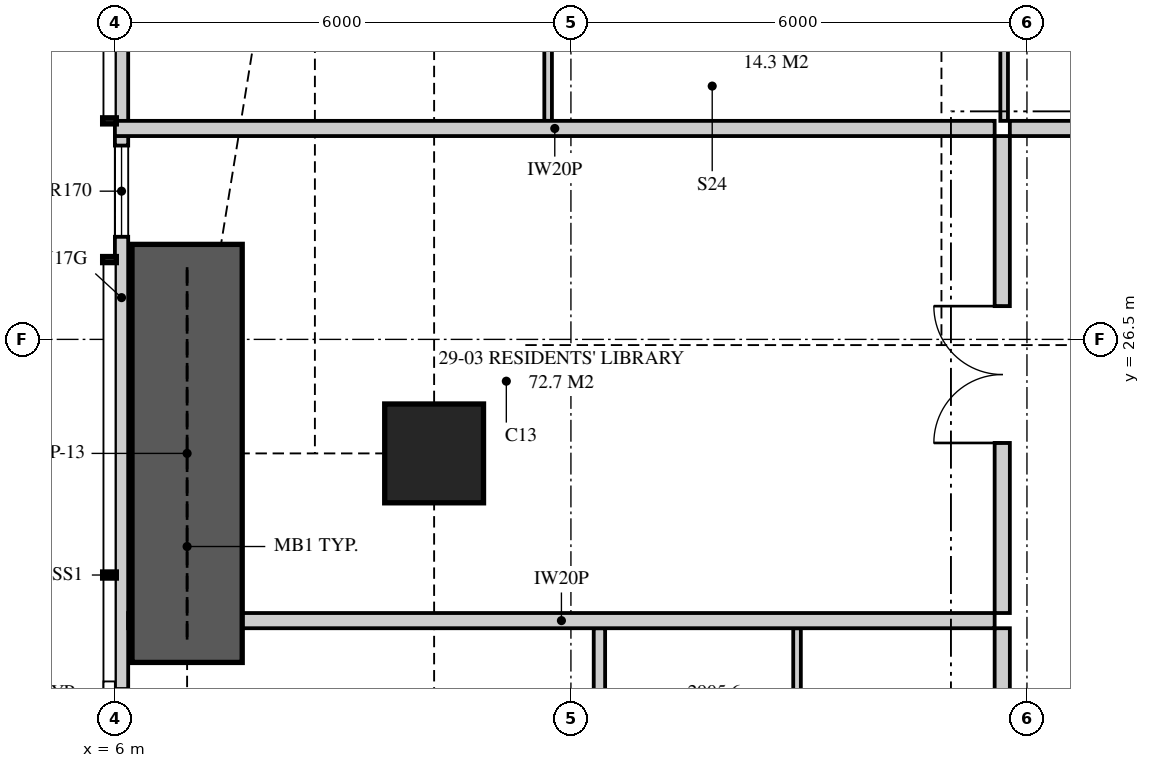
"""IFC4 building model, lengths in metres.
Left out: names, types, materials, properties, quantities, classifications, styles, units other than length and angle.
Written with IfcOpenShell. Run it as: python <this file> out.ifc"""

import sys

from ifc_helpers import new_model, si_unit, direction, frame, frame_2d, origin, origin_2d, place, context, subcontext, project, spatial, polyline, rectangle, outline, extrude, element, fill, save


model = new_model("IFC4")
c1 = context("Model", 3, precision=1e-05, world=origin(), true_north=direction((0.0, 1.0)))
c2 = subcontext(c1, "Body", "Model", "MODEL_VIEW")
j1 = project(units=[si_unit("LENGTHUNIT", "METRE"), si_unit("PLANEANGLEUNIT", "RADIAN")], contexts=[c1])
p1 = place(None, origin())
s1 = spatial("IfcSite", under=j1, at=p1, CompositionType="ELEMENT")
p2 = place(p1, origin())
s2 = spatial("IfcBuilding", under=s1, at=p2, CompositionType="ELEMENT")
p3 = place(p2, frame((0.0, 0.0, 108.2)))
s3 = spatial("IfcBuildingStorey", under=s2, at=p3, CompositionType="ELEMENT", Elevation=108.2)
p4 = place(p3, frame((10.2, 25.0, 0.0), z_axis=(0.0, 0.0, 1.0), x_axis=(1.0, 0.0, 0.0)))
e1 = element("IfcColumn", 1, at=p4, inside=s3, PredefinedType="COLUMN", context=c2, shape_type="SweptSolid", body=[
    extrude(rectangle(XDim=1.3, YDim=1.3, at=origin_2d()), origin(), (0.0, 0.0, 1.0), 3.35),
])
p5 = place(p3, frame((6.087, 34.949, 0.0), z_axis=(0.0, 0.0, 1.0), x_axis=(0.0, -1.0, 0.0)))
e2 = element("IfcWall", 2, at=p5, inside=s3, PredefinedType="SOLIDWALL", context=c2, shape_type="SweptSolid", body=[
    extrude(outline(polyline([(0.0, 0.0), (15.799, 0.0), (15.799, 2.15), (9.949, 2.15), (9.949, 3.11), (9.823, 3.11), (9.823, 2.15), (9.73, 2.15), (9.73, 3.11), (0.0, 3.11), (0.0, 0.0)])), frame((0.0, 0.087, 0.0), z_axis=(0.0, -1.0, 0.0), x_axis=(1.0, 0.0, 0.0)), (0.0, 0.0, 1.0), 0.175),
])
p6 = place(p5, frame((2.724, 0.0, 0.4)))
e3 = element("IfcOpeningElement", 3, at=p6, cuts=e2, PredefinedType="OPENING", context=c2, shape_type="SweptSolid", body=[
    extrude(rectangle(XDim=1.8, YDim=1.7, at=frame_2d((0.9, 0.85))), frame((0.0, 0.097, 0.0), z_axis=(0.0, -1.0, 0.0), x_axis=(1.0, 0.0, 0.0)), (0.0, 0.0, 1.0), 0.195),
])
p7 = place(p5, frame((5.899, 0.0, 0.4)))
e4 = element("IfcOpeningElement", 4, at=p7, cuts=e2, PredefinedType="OPENING", context=c2, shape_type="SweptSolid", body=[
    extrude(rectangle(XDim=1.2, YDim=1.7, at=frame_2d((0.6, 0.85))), frame((0.0, 0.097, 0.0), z_axis=(0.0, -1.0, 0.0), x_axis=(1.0, 0.0, 0.0)), (0.0, 0.0, 1.0), 0.195),
])
p8 = place(p5, frame((13.049, 0.0, 0.4)))
e5 = element("IfcOpeningElement", 5, at=p8, cuts=e2, PredefinedType="OPENING", context=c2, shape_type="SweptSolid", body=[
    extrude(rectangle(XDim=1.8, YDim=1.7, at=frame_2d((0.9, 0.85))), frame((0.0, 0.097, 0.0), z_axis=(0.0, -1.0, 0.0), x_axis=(1.0, 0.0, 0.0)), (0.0, 0.0, 1.0), 0.195),
])
p9 = place(p3, frame((17.775, 29.275, 0.0), z_axis=(0.0, 0.0, 1.0), x_axis=(1.0, 0.0, 0.0)))
e6 = element("IfcWall", 6, at=p9, inside=s3, PredefinedType="PARTITIONING", context=c2, shape_type="SweptSolid", body=[
    extrude(rectangle(XDim=9.188, YDim=0.2, at=frame_2d((4.594, 0.0))), origin(), (0.0, 0.0, 1.0), 3.11),
])
p10 = place(p9, frame((5.05, 0.0, 0.0)))
e7 = element("IfcOpeningElement", 7, at=p10, cuts=e6, PredefinedType="OPENING", context=c2, shape_type="SweptSolid", body=[
    extrude(rectangle(XDim=1.05, YDim=2.2, at=frame_2d((0.525, 1.1))), frame((0.0, 0.11, 0.0), z_axis=(0.0, -1.0, 0.0), x_axis=(1.0, 0.0, 0.0)), (0.0, 0.0, 1.0), 0.22),
])
p11 = place(p3, frame((11.7, 37.825, 0.0), z_axis=(0.0, 0.0, 1.0), x_axis=(0.0, -1.0, 0.0)))
e8 = element("IfcWall", 8, at=p11, inside=s3, PredefinedType="PARTITIONING", context=c2, shape_type="SweptSolid", body=[
    extrude(outline(polyline([(0.0, 0.0), (8.45, 0.0), (8.45, 3.11), (2.708, 3.11), (2.708, 2.15), (0.953, 2.15), (0.953, 3.11), (0.0, 3.11), (0.0, 0.0)])), frame((0.0, 0.05, 0.0), z_axis=(0.0, -1.0, 0.0), x_axis=(1.0, 0.0, 0.0)), (0.0, 0.0, 1.0), 0.1),
])
p12 = place(p11, frame((2.701, 0.0, 0.0)))
e9 = element("IfcOpeningElement", 9, at=p12, cuts=e8, PredefinedType="OPENING", context=c2, shape_type="SweptSolid", body=[
    extrude(rectangle(XDim=0.9, YDim=2.1, at=frame_2d((0.45, 1.05))), frame((0.0, 0.06, 0.0), z_axis=(0.0, -1.0, 0.0), x_axis=(1.0, 0.0, 0.0)), (0.0, 0.0, 1.0), 0.12),
])
p13 = place(p11, frame((6.025, 0.0, 0.0)))
e10 = element("IfcOpeningElement", 10, at=p13, cuts=e8, PredefinedType="OPENING", context=c2, shape_type="SweptSolid", body=[
    extrude(rectangle(XDim=0.9, YDim=2.1, at=frame_2d((0.45, 1.05))), frame((0.0, 0.06, 0.0), z_axis=(0.0, -1.0, 0.0), x_axis=(1.0, 0.0, 0.0)), (0.0, 0.0, 1.0), 0.12),
])
p14 = place(p3, frame((17.7, 37.825, 0.0), z_axis=(0.0, 0.0, 1.0), x_axis=(0.0, -1.0, 0.0)))
e11 = element("IfcWall", 11, at=p14, inside=s3, PredefinedType="PARTITIONING", context=c2, shape_type="SweptSolid", body=[
    extrude(outline(polyline([(1.635, 2.15), (0.0, 2.15), (0.0, 0.0), (8.45, 0.0), (8.45, 3.11), (1.635, 3.11), (1.635, 2.15)]), holes=[polyline([(1.021, 0.116), (0.529, 0.116), (0.529, 0.906), (1.021, 0.906), (1.021, 0.116)]), polyline([(1.021, 1.244), (0.529, 1.244), (0.529, 2.034), (1.021, 2.034), (1.021, 1.244)])]), frame((0.0, 0.05, 0.0), z_axis=(0.0, -1.0, 0.0), x_axis=(1.0, 0.0, 0.0)), (0.0, 0.0, 1.0), 0.1),
])
p15 = place(p14, frame((4.6, 0.0, 0.0)))
e12 = element("IfcOpeningElement", 12, at=p15, cuts=e11, PredefinedType="OPENING", context=c2, shape_type="SweptSolid", body=[
    extrude(rectangle(XDim=0.9, YDim=2.1, at=frame_2d((0.45, 1.05))), frame((0.0, 0.06, 0.0), z_axis=(0.0, -1.0, 0.0), x_axis=(1.0, 0.0, 0.0)), (0.0, 0.0, 1.0), 0.12),
])
p16 = place(p3, frame((6.0, 29.275, 0.0), z_axis=(0.0, 0.0, 1.0), x_axis=(1.0, 0.0, 0.0)))
e13 = element("IfcWall", 13, at=p16, inside=s3, PredefinedType="PARTITIONING", context=c2, shape_type="SweptSolid", body=[
    extrude(outline(polyline([(0.0, 0.0), (11.575, 0.0), (11.575, 3.11), (11.212, 3.11), (11.212, 2.541), (10.538, 2.541), (10.538, 3.11), (5.51, 3.11), (5.51, 2.51), (2.969, 2.51), (2.969, 2.541), (2.565, 2.541), (2.565, 2.15), (0.721, 2.15), (0.721, 3.11), (0.0, 3.11), (0.0, 0.0)])), frame((0.0, 0.1, 0.0), z_axis=(0.0, -1.0, 0.0), x_axis=(1.0, 0.0, 0.0)), (0.0, 0.0, 1.0), 0.2),
])
p17 = place(p3, frame((6.175, 22.8, 0.0), z_axis=(0.0, 0.0, 1.0), x_axis=(1.0, 0.0, 0.0)))
e14 = element("IfcWall", 14, at=p17, inside=s3, PredefinedType="PARTITIONING", context=c2, shape_type="SweptSolid", body=[
    extrude(outline(polyline([(0.0, 0.0), (11.4, 0.0), (11.4, 3.11), (5.335, 3.11), (5.335, 2.51), (2.715, 2.51), (2.715, 3.11), (1.685, 3.11), (1.685, 2.15), (0.0, 2.15), (0.0, 0.0)])), frame((0.0, 0.1, 0.0), z_axis=(0.0, -1.0, 0.0), x_axis=(1.0, 0.0, 0.0)), (0.0, 0.0, 1.0), 0.2),
])
p18 = place(p3, frame((12.375, 19.25, 0.0), z_axis=(0.0, 0.0, 1.0), x_axis=(0.0, 1.0, 0.0)))
e15 = element("IfcWall", 15, at=p18, inside=s3, PredefinedType="PLUMBINGWALL", context=c2, shape_type="SweptSolid", body=[
    extrude(rectangle(XDim=3.45, YDim=0.15, at=frame_2d((1.725, 0.0))), origin(), (0.0, 0.0, 1.0), 3.11),
])
p19 = place(p18, frame((0.4, 0.0, 0.0)))
e16 = element("IfcOpeningElement", 16, at=p19, cuts=e15, PredefinedType="OPENING", context=c2, shape_type="SweptSolid", body=[
    extrude(rectangle(XDim=0.9, YDim=2.1, at=frame_2d((0.45, 1.05))), frame((0.0, 0.085, 0.0), z_axis=(0.0, -1.0, 0.0), x_axis=(1.0, 0.0, 0.0)), (0.0, 0.0, 1.0), 0.17),
])
p20 = place(p3, frame((14.975, 19.25, 0.0), z_axis=(0.0, 0.0, 1.0), x_axis=(0.0, 1.0, 0.0)))
e17 = element("IfcWall", 17, at=p20, inside=s3, PredefinedType="PARTITIONING", context=c2, shape_type="SweptSolid", body=[
    extrude(rectangle(XDim=3.45, YDim=0.1, at=frame_2d((1.725, 0.0))), origin(), (0.0, 0.0, 1.0), 3.11),
])
p21 = place(p3, frame((17.675, 22.9, 0.0), z_axis=(0.0, 0.0, 1.0), x_axis=(0.0, 1.0, 0.0)))
e18 = element("IfcWall", 18, at=p21, inside=s3, PredefinedType="PARTITIONING", context=c2, shape_type="SweptSolid", body=[
    extrude(outline(polyline([(0.0, 0.0), (6.275, 0.0), (6.275, 3.11), (3.862, 3.11), (3.862, 2.541), (3.188, 2.541), (3.188, 3.11), (0.0, 3.11), (0.0, 0.0)])), frame((0.0, 0.1, 0.0), z_axis=(0.0, -1.0, 0.0), x_axis=(1.0, 0.0, 0.0)), (0.0, 0.0, 1.0), 0.2),
])
p22 = place(p21, frame((2.238, 0.0, 0.0)))
e19 = element("IfcOpeningElement", 19, at=p22, cuts=e18, PredefinedType="OPENING", context=c2, shape_type="SweptSolid", body=[
    extrude(rectangle(XDim=1.8, YDim=2.1, at=frame_2d((0.9, 1.05))), frame((0.0, 0.11, 0.0), z_axis=(0.0, -1.0, 0.0), x_axis=(1.0, 0.0, 0.0)), (0.0, 0.0, 1.0), 0.22),
])
p23 = place(p3, frame((17.675, 17.262, 0.0), z_axis=(0.0, 0.0, 1.0), x_axis=(0.0, 1.0, 0.0)))
e20 = element("IfcWall", 20, at=p23, inside=s3, PredefinedType="PARTITIONING", context=c2, shape_type="SweptSolid", body=[
    extrude(rectangle(XDim=5.438, YDim=0.2, at=frame_2d((2.719, 0.0))), origin(), (0.0, 0.0, 1.0), 3.11),
])
p24 = place(p3, frame((6.95, 22.25, 0.0), z_axis=(0.0, 0.0, 1.0), x_axis=(0.0, 1.0, 0.0)))
e21 = element("IfcWall", 21, at=p24, inside=s3, PredefinedType="SHEAR", context=c2, shape_type="SweptSolid", body=[
    extrude(rectangle(XDim=5.5, YDim=1.45, at=frame_2d((2.75, 0.0))), origin(), (0.0, 0.0, 1.0), 3.35),
])
p25 = place(p7, origin())
e22 = element("IfcWindow", 22, at=p25, inside=s3, PartitioningType="SINGLE_PANEL", PredefinedType="WINDOW", context=c2, shape_type="SweptSolid", body=[
    extrude(rectangle(XDim=1.2, YDim=1.7, at=frame_2d((0.6, 0.85))), frame((0.0, 0.03, 0.0), z_axis=(0.0, -1.0, 0.0), x_axis=(1.0, 0.0, 0.0)), (0.0, 0.0, 1.0), 0.06),
])
fill(e4, e22)
p26 = place(p8, origin())
e23 = element("IfcWindow", 23, at=p26, inside=s3, PartitioningType="SINGLE_PANEL", PredefinedType="WINDOW", context=c2, shape_type="SweptSolid", body=[
    extrude(rectangle(XDim=1.8, YDim=1.7, at=frame_2d((0.9, 0.85))), frame((0.0, 0.03, 0.0), z_axis=(0.0, -1.0, 0.0), x_axis=(1.0, 0.0, 0.0)), (0.0, 0.0, 1.0), 0.06),
])
fill(e5, e23)
p27 = place(p22, origin())
e24 = element("IfcDoor", 24, at=p27, inside=s3, OperationType="DOUBLE_DOOR_SINGLE_SWING", PredefinedType="DOOR", context=c2, shape_type="SweptSolid", body=[
    extrude(rectangle(XDim=1.8, YDim=2.1, at=frame_2d((0.9, 1.05))), frame((0.0, 0.025, 0.0), z_axis=(0.0, -1.0, 0.0), x_axis=(1.0, 0.0, 0.0)), (0.0, 0.0, 1.0), 0.05),
])
fill(e19, e24)
save(model, sys.argv[1])
